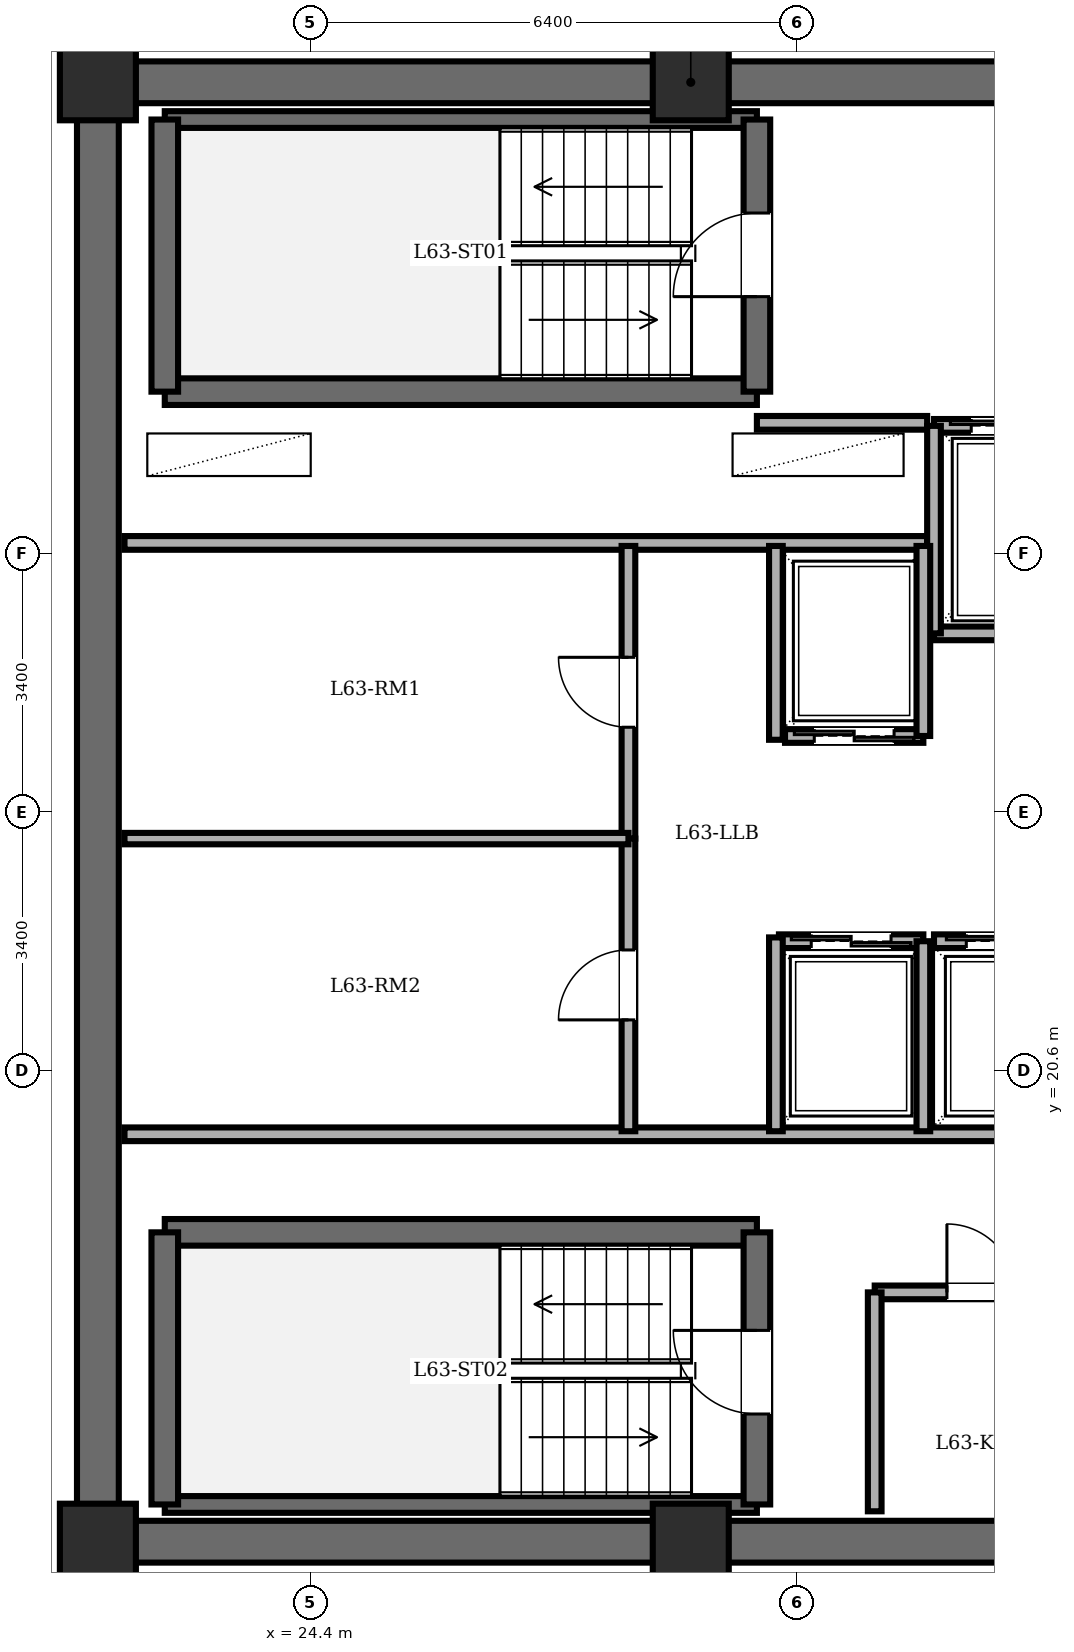
"""IFC4 building model, lengths in metres.
Left out: names, types, materials, properties, quantities, classifications, styles, units other than length and angle.
Written with IfcOpenShell. Run it as: python <this file> out.ifc"""

import sys

from ifc_helpers import new_model, si_unit, direction, frame, frame_2d, origin, origin_2d, place, context, subcontext, project, spatial, rectangle, extrude, element, fill, save


model = new_model("IFC4")
c1 = context("Model", 3, precision=1e-05, world=origin(), true_north=direction((0.0, 1.0)))
c2 = subcontext(c1, "Body", "Model", "MODEL_VIEW")
j1 = project(units=[si_unit("LENGTHUNIT", "METRE"), si_unit("PLANEANGLEUNIT", "RADIAN")], contexts=[c1])
p1 = place(None, origin())
s1 = spatial("IfcSite", under=j1, at=p1, CompositionType="ELEMENT")
p2 = place(p1, origin())
s2 = spatial("IfcBuilding", under=s1, at=p2, CompositionType="ELEMENT")
p3 = place(p2, frame((0.0, 0.0, 240.9)))
s3 = spatial("IfcBuildingStorey", under=s2, at=p3, CompositionType="ELEMENT", Elevation=240.9)
for number, where, z_axis, x_axis in (
    (1, (21.6, 14.4, 0.0), (0.0, 0.0, 1.0), (1.0, 0.0, 0.0)),
    (2, (29.4, 14.4, 0.0), (0.0, 0.0, 1.0), (1.0, 0.0, 0.0)),
    (3, (29.4, 33.6, 0.0), (0.0, 0.0, 1.0), (1.0, 0.0, 0.0)),
    (4, (21.6, 33.6, 0.0), (0.0, 0.0, 1.0), (1.0, 0.0, 0.0)),
):
    element("IfcColumn", number, at=place(p3, frame(where, z_axis=z_axis, x_axis=x_axis)), inside=s3, PredefinedType="COLUMN", context=c2, shape_type="SweptSolid", body=[
        extrude(rectangle(XDim=1.0, YDim=1.0, at=origin_2d()), origin(), (0.0, 0.0, 1.0), 3.6),
    ])
p4 = place(p3, frame((21.6, 14.4, 0.0), z_axis=(0.0, 0.0, 1.0), x_axis=(0.0, 1.0, 0.0)))
e5 = element("IfcWall", 5, at=p4, inside=s3, PredefinedType="SHEAR", context=c2, shape_type="SweptSolid", body=[
    extrude(rectangle(XDim=19.2, YDim=0.55, at=frame_2d((9.6, 0.0))), origin(), (0.0, 0.0, 1.0), 3.4),
])
for number, where, z_axis, x_axis in (
    (6, (21.6, 33.6, 0.0), (0.0, 0.0, 1.0), (1.0, 0.0, 0.0)),
    (7, (37.2, 14.4, 0.0), (0.0, 0.0, 1.0), (-1.0, 0.0, 0.0)),
):
    element("IfcWall", number, at=place(p3, frame(where, z_axis=z_axis, x_axis=x_axis)), inside=s3, PredefinedType="SHEAR", context=c2, shape_type="SweptSolid", body=[
        extrude(rectangle(XDim=15.6, YDim=0.55, at=frame_2d((7.8, 0.0))), origin(), (0.0, 0.0, 1.0), 3.4),
    ])
p5 = place(p3, frame((22.48, 29.53, 0.0), z_axis=(0.0, 0.0, 1.0), x_axis=(1.0, 0.0, 0.0)))
e8 = element("IfcWall", 8, at=p5, inside=s3, PredefinedType="SOLIDWALL", context=c2, shape_type="SweptSolid", body=[
    extrude(rectangle(XDim=7.79, YDim=0.35, at=frame_2d((3.895, 0.0))), origin(), (0.0, 0.0, 1.0), 3.4),
])
p6 = place(p3, frame((22.48, 33.11, 0.0), z_axis=(0.0, 0.0, 1.0), x_axis=(1.0, 0.0, 0.0)))
e9 = element("IfcWall", 9, at=p6, inside=s3, PredefinedType="PARTITIONING", context=c2, shape_type="SweptSolid", body=[
    extrude(rectangle(XDim=7.79, YDim=0.22, at=frame_2d((3.895, 0.0))), origin(), (0.0, 0.0, 1.0), 3.4),
])
p7 = place(p3, frame((22.48, 29.53, 0.0), z_axis=(0.0, 0.0, 1.0), x_axis=(0.0, 1.0, 0.0)))
e10 = element("IfcWall", 10, at=p7, inside=s3, PredefinedType="SOLIDWALL", context=c2, shape_type="SweptSolid", body=[
    extrude(rectangle(XDim=3.58, YDim=0.35, at=frame_2d((1.79, 0.0))), origin(), (0.0, 0.0, 1.0), 3.4),
])
p8 = place(p3, frame((30.27, 29.53, 0.0), z_axis=(0.0, 0.0, 1.0), x_axis=(0.0, 1.0, 0.0)))
e11 = element("IfcWall", 11, at=p8, inside=s3, PredefinedType="SOLIDWALL", context=c2, shape_type="SweptSolid", body=[
    extrude(rectangle(XDim=3.58, YDim=0.35, at=frame_2d((1.79, 0.0))), origin(), (0.0, 0.0, 1.0), 3.4),
])
p9 = place(p8, frame((1.25, 0.0, 0.0)))
e12 = element("IfcOpeningElement", 12, at=p9, cuts=e11, PredefinedType="OPENING", context=c2, shape_type="SweptSolid", body=[
    extrude(rectangle(XDim=1.1, YDim=2.15, at=frame_2d((0.55, 1.075))), frame((0.0, 0.185, 0.0), z_axis=(0.0, -1.0, 0.0), x_axis=(1.0, 0.0, 0.0)), (0.0, 0.0, 1.0), 0.37),
])
p10 = place(p3, frame((22.48, 18.47, 0.0), z_axis=(0.0, 0.0, 1.0), x_axis=(1.0, 0.0, 0.0)))
e13 = element("IfcWall", 13, at=p10, inside=s3, PredefinedType="SOLIDWALL", context=c2, shape_type="SweptSolid", body=[
    extrude(rectangle(XDim=7.79, YDim=0.35, at=frame_2d((3.895, 0.0))), origin(), (0.0, 0.0, 1.0), 3.4),
])
p11 = place(p3, frame((22.48, 14.89, 0.0), z_axis=(0.0, 0.0, 1.0), x_axis=(1.0, 0.0, 0.0)))
e14 = element("IfcWall", 14, at=p11, inside=s3, PredefinedType="PARTITIONING", context=c2, shape_type="SweptSolid", body=[
    extrude(rectangle(XDim=7.79, YDim=0.22, at=frame_2d((3.895, 0.0))), origin(), (0.0, 0.0, 1.0), 3.4),
])
p12 = place(p3, frame((22.48, 14.89, 0.0), z_axis=(0.0, 0.0, 1.0), x_axis=(0.0, 1.0, 0.0)))
e15 = element("IfcWall", 15, at=p12, inside=s3, PredefinedType="SOLIDWALL", context=c2, shape_type="SweptSolid", body=[
    extrude(rectangle(XDim=3.58, YDim=0.35, at=frame_2d((1.79, 0.0))), origin(), (0.0, 0.0, 1.0), 3.4),
])
p13 = place(p3, frame((30.27, 14.89, 0.0), z_axis=(0.0, 0.0, 1.0), x_axis=(0.0, 1.0, 0.0)))
e16 = element("IfcWall", 16, at=p13, inside=s3, PredefinedType="SOLIDWALL", context=c2, shape_type="SweptSolid", body=[
    extrude(rectangle(XDim=3.58, YDim=0.35, at=frame_2d((1.79, 0.0))), origin(), (0.0, 0.0, 1.0), 3.4),
])
p14 = place(p13, frame((1.19, 0.0, 0.0)))
e17 = element("IfcOpeningElement", 17, at=p14, cuts=e16, PredefinedType="OPENING", context=c2, shape_type="SweptSolid", body=[
    extrude(rectangle(XDim=1.1, YDim=2.15, at=frame_2d((0.55, 1.075))), frame((0.0, 0.185, 0.0), z_axis=(0.0, -1.0, 0.0), x_axis=(1.0, 0.0, 0.0)), (0.0, 0.0, 1.0), 0.37),
])
p15 = place(p3, frame((30.27, 29.12, 0.0), z_axis=(0.0, 0.0, 1.0), x_axis=(1.0, 0.0, 0.0)))
e18 = element("IfcWall", 18, at=p15, inside=s3, PredefinedType="PARTITIONING", context=c2, shape_type="SweptSolid", body=[
    extrude(rectangle(XDim=2.24, YDim=0.18, at=frame_2d((1.12, 0.0))), origin(), (0.0, 0.0, 1.0), 3.4),
])
p16 = place(p3, frame((21.95, 27.54, 0.0), z_axis=(0.0, 0.0, 1.0), x_axis=(1.0, 0.0, 0.0)))
e19 = element("IfcWall", 19, at=p16, inside=s3, PredefinedType="PARTITIONING", context=c2, shape_type="SweptSolid", body=[
    extrude(rectangle(XDim=10.56, YDim=0.18, at=frame_2d((5.28, 0.0))), origin(), (0.0, 0.0, 1.0), 3.4),
])
p17 = place(p3, frame((21.95, 19.76, 0.0), z_axis=(0.0, 0.0, 1.0), x_axis=(1.0, 0.0, 0.0)))
e20 = element("IfcWall", 20, at=p17, inside=s3, PredefinedType="PARTITIONING", context=c2, shape_type="SweptSolid", body=[
    extrude(rectangle(XDim=14.87, YDim=0.18, at=frame_2d((7.435, 0.0))), origin(), (0.0, 0.0, 1.0), 3.4),
])
p18 = place(p3, frame((31.82, 17.68, 0.0), z_axis=(0.0, 0.0, 1.0), x_axis=(1.0, 0.0, 0.0)))
e21 = element("IfcWall", 21, at=p18, inside=s3, PredefinedType="PARTITIONING", context=c2, shape_type="SweptSolid", body=[
    extrude(rectangle(XDim=2.66, YDim=0.18, at=frame_2d((1.33, 0.0))), origin(), (0.0, 0.0, 1.0), 3.4),
])
p19 = place(p18, frame((0.95, 0.0, 0.0)))
e22 = element("IfcOpeningElement", 22, at=p19, cuts=e21, PredefinedType="OPENING", context=c2, shape_type="SweptSolid", body=[
    extrude(rectangle(XDim=0.9, YDim=2.05, at=frame_2d((0.45, 1.025))), frame((0.0, 0.1, 0.0), z_axis=(0.0, -1.0, 0.0), x_axis=(1.0, 0.0, 0.0)), (0.0, 0.0, 1.0), 0.2),
])
p20 = place(p3, frame((31.82, 14.8, 0.0), z_axis=(0.0, 0.0, 1.0), x_axis=(0.0, 1.0, 0.0)))
e23 = element("IfcWall", 23, at=p20, inside=s3, PredefinedType="PARTITIONING", context=c2, shape_type="SweptSolid", body=[
    extrude(rectangle(XDim=2.88, YDim=0.18, at=frame_2d((1.44, 0.0))), origin(), (0.0, 0.0, 1.0), 3.4),
])
p21 = place(p3, frame((32.6, 29.08, 0.0), z_axis=(0.0, 0.0, 1.0), x_axis=(1.0, 0.0, 0.0)))
e24 = element("IfcWall", 24, at=p21, inside=s3, PredefinedType="PARTITIONING", context=c2, shape_type="SweptSolid", body=[
    extrude(rectangle(XDim=2.08, YDim=0.18, at=frame_2d((1.04, 0.0))), origin(), (0.0, 0.0, 1.0), 3.4),
])
p22 = place(p21, frame((0.49, 0.0, 0.0)))
e25 = element("IfcOpeningElement", 25, at=p22, cuts=e24, PredefinedType="OPENING", context=c2, shape_type="SweptSolid", body=[
    extrude(rectangle(XDim=1.1, YDim=2.2, at=frame_2d((0.55, 1.1))), frame((0.0, 0.1, 0.0), z_axis=(0.0, -1.0, 0.0), x_axis=(1.0, 0.0, 0.0)), (0.0, 0.0, 1.0), 0.2),
])
p23 = place(p3, frame((34.68, 26.35, 0.0), z_axis=(0.0, 0.0, 1.0), x_axis=(-1.0, 0.0, 0.0)))
e26 = element("IfcWall", 26, at=p23, inside=s3, PredefinedType="PARTITIONING", context=c2, shape_type="SweptSolid", body=[
    extrude(rectangle(XDim=2.08, YDim=0.18, at=frame_2d((1.04, 0.0))), origin(), (0.0, 0.0, 1.0), 3.4),
])
p24 = place(p3, frame((32.6, 29.08, 0.0), z_axis=(0.0, 0.0, 1.0), x_axis=(0.0, -1.0, 0.0)))
e27 = element("IfcWall", 27, at=p24, inside=s3, PredefinedType="PARTITIONING", context=c2, shape_type="SweptSolid", body=[
    extrude(rectangle(XDim=2.73, YDim=0.18, at=frame_2d((1.365, 0.0))), origin(), (0.0, 0.0, 1.0), 3.4),
])
p25 = place(p3, frame((32.46, 25.0, 0.0), z_axis=(0.0, 0.0, 1.0), x_axis=(-1.0, 0.0, 0.0)))
e28 = element("IfcWall", 28, at=p25, inside=s3, PredefinedType="PARTITIONING", context=c2, shape_type="SweptSolid", body=[
    extrude(rectangle(XDim=1.82, YDim=0.18, at=frame_2d((0.91, 0.0))), origin(), (0.0, 0.0, 1.0), 3.4),
])
p26 = place(p25, frame((0.385, 0.0, 0.0)))
e29 = element("IfcOpeningElement", 29, at=p26, cuts=e28, PredefinedType="OPENING", context=c2, shape_type="SweptSolid", body=[
    extrude(rectangle(XDim=1.05, YDim=2.2, at=frame_2d((0.525, 1.1))), frame((0.0, 0.1, 0.0), z_axis=(0.0, -1.0, 0.0), x_axis=(1.0, 0.0, 0.0)), (0.0, 0.0, 1.0), 0.2),
])
p27 = place(p3, frame((32.46, 25.0, 0.0), z_axis=(0.0, 0.0, 1.0), x_axis=(0.0, 1.0, 0.0)))
e30 = element("IfcWall", 30, at=p27, inside=s3, PredefinedType="PARTITIONING", context=c2, shape_type="SweptSolid", body=[
    extrude(rectangle(XDim=2.5, YDim=0.18, at=frame_2d((1.25, 0.0))), origin(), (0.0, 0.0, 1.0), 3.4),
])
p28 = place(p3, frame((30.56, 22.3, 0.0), z_axis=(0.0, 0.0, 1.0), x_axis=(1.0, 0.0, 0.0)))
e31 = element("IfcWall", 31, at=p28, inside=s3, PredefinedType="PARTITIONING", context=c2, shape_type="SweptSolid", body=[
    extrude(rectangle(XDim=1.9, YDim=0.18, at=frame_2d((0.95, 0.0))), origin(), (0.0, 0.0, 1.0), 3.4),
])
p29 = place(p28, frame((0.425, 0.0, 0.0)))
e32 = element("IfcOpeningElement", 32, at=p29, cuts=e31, PredefinedType="OPENING", context=c2, shape_type="SweptSolid", body=[
    extrude(rectangle(XDim=1.05, YDim=2.2, at=frame_2d((0.525, 1.1))), frame((0.0, 0.1, 0.0), z_axis=(0.0, -1.0, 0.0), x_axis=(1.0, 0.0, 0.0)), (0.0, 0.0, 1.0), 0.2),
])
p30 = place(p3, frame((32.46, 19.8, 0.0), z_axis=(0.0, 0.0, 1.0), x_axis=(0.0, 1.0, 0.0)))
e33 = element("IfcWall", 33, at=p30, inside=s3, PredefinedType="PARTITIONING", context=c2, shape_type="SweptSolid", body=[
    extrude(rectangle(XDim=2.5, YDim=0.18, at=frame_2d((1.25, 0.0))), origin(), (0.0, 0.0, 1.0), 3.4),
])
p31 = place(p3, frame((32.6, 22.3, 0.0), z_axis=(0.0, 0.0, 1.0), x_axis=(1.0, 0.0, 0.0)))
e34 = element("IfcWall", 34, at=p31, inside=s3, PredefinedType="PARTITIONING", context=c2, shape_type="SweptSolid", body=[
    extrude(rectangle(XDim=1.9, YDim=0.18, at=frame_2d((0.95, 0.0))), origin(), (0.0, 0.0, 1.0), 3.4),
])
p32 = place(p31, frame((0.425, 0.0, 0.0)))
e35 = element("IfcOpeningElement", 35, at=p32, cuts=e34, PredefinedType="OPENING", context=c2, shape_type="SweptSolid", body=[
    extrude(rectangle(XDim=1.05, YDim=2.2, at=frame_2d((0.525, 1.1))), frame((0.0, 0.1, 0.0), z_axis=(0.0, -1.0, 0.0), x_axis=(1.0, 0.0, 0.0)), (0.0, 0.0, 1.0), 0.2),
])
for number, where, z_axis, x_axis in (
    (36, (30.52, 24.95, 0.0), (0.0, 0.0, 1.0), (0.0, 1.0, 0.0)),
    (37, (30.52, 19.8, 0.0), (0.0, 0.0, 1.0), (0.0, 1.0, 0.0)),
):
    element("IfcWall", number, at=place(p3, frame(where, z_axis=z_axis, x_axis=x_axis)), inside=s3, PredefinedType="PARTITIONING", context=c2, shape_type="SweptSolid", body=[
        extrude(rectangle(XDim=2.55, YDim=0.18, at=frame_2d((1.275, 0.0))), origin(), (0.0, 0.0, 1.0), 3.4),
    ])
p33 = place(p3, frame((28.58, 23.65, 0.0), z_axis=(0.0, 0.0, 1.0), x_axis=(0.0, 1.0, 0.0)))
e38 = element("IfcWall", 38, at=p33, inside=s3, PredefinedType="PARTITIONING", context=c2, shape_type="SweptSolid", body=[
    extrude(rectangle(XDim=3.85, YDim=0.18, at=frame_2d((1.925, 0.0))), origin(), (0.0, 0.0, 1.0), 3.4),
])
p34 = place(p33, frame((1.465, 0.0, 0.0)))
e39 = element("IfcOpeningElement", 39, at=p34, cuts=e38, PredefinedType="OPENING", context=c2, shape_type="SweptSolid", body=[
    extrude(rectangle(XDim=0.92, YDim=2.1, at=frame_2d((0.46, 1.05))), frame((0.0, 0.1, 0.0), z_axis=(0.0, -1.0, 0.0), x_axis=(1.0, 0.0, 0.0)), (0.0, 0.0, 1.0), 0.2),
])
p35 = place(p3, frame((28.58, 19.8, 0.0), z_axis=(0.0, 0.0, 1.0), x_axis=(0.0, 1.0, 0.0)))
e40 = element("IfcWall", 40, at=p35, inside=s3, PredefinedType="PARTITIONING", context=c2, shape_type="SweptSolid", body=[
    extrude(rectangle(XDim=3.85, YDim=0.18, at=frame_2d((1.925, 0.0))), origin(), (0.0, 0.0, 1.0), 3.4),
])
p36 = place(p35, frame((1.465, 0.0, 0.0)))
e41 = element("IfcOpeningElement", 41, at=p36, cuts=e40, PredefinedType="OPENING", context=c2, shape_type="SweptSolid", body=[
    extrude(rectangle(XDim=0.92, YDim=2.1, at=frame_2d((0.46, 1.05))), frame((0.0, 0.1, 0.0), z_axis=(0.0, -1.0, 0.0), x_axis=(1.0, 0.0, 0.0)), (0.0, 0.0, 1.0), 0.2),
])
p37 = place(p3, frame((21.95, 23.65, 0.0), z_axis=(0.0, 0.0, 1.0), x_axis=(1.0, 0.0, 0.0)))
e42 = element("IfcWall", 42, at=p37, inside=s3, PredefinedType="PARTITIONING", context=c2, shape_type="SweptSolid", body=[
    extrude(rectangle(XDim=6.63, YDim=0.15, at=frame_2d((3.315, 0.0))), origin(), (0.0, 0.0, 1.0), 3.4),
])
p38 = place(p9, origin())
e43 = element("IfcDoor", 43, at=p38, inside=s3, OperationType="SINGLE_SWING_LEFT", PredefinedType="DOOR", context=c2, shape_type="SweptSolid", body=[
    extrude(rectangle(XDim=1.1, YDim=2.15, at=frame_2d((0.55, 1.075))), frame((0.0, 0.025, 0.0), z_axis=(0.0, -1.0, 0.0), x_axis=(1.0, 0.0, 0.0)), (0.0, 0.0, 1.0), 0.05),
])
fill(e12, e43)
p39 = place(p14, origin())
e44 = element("IfcDoor", 44, at=p39, inside=s3, OperationType="SINGLE_SWING_RIGHT", PredefinedType="DOOR", context=c2, shape_type="SweptSolid", body=[
    extrude(rectangle(XDim=1.1, YDim=2.15, at=frame_2d((0.55, 1.075))), frame((0.0, 0.025, 0.0), z_axis=(0.0, -1.0, 0.0), x_axis=(1.0, 0.0, 0.0)), (0.0, 0.0, 1.0), 0.05),
])
fill(e17, e44)
p40 = place(p19, origin())
e45 = element("IfcDoor", 45, at=p40, inside=s3, OperationType="SINGLE_SWING_LEFT", PredefinedType="DOOR", context=c2, shape_type="SweptSolid", body=[
    extrude(rectangle(XDim=0.9, YDim=2.05, at=frame_2d((0.45, 1.025))), frame((0.0, 0.025, 0.0), z_axis=(0.0, -1.0, 0.0), x_axis=(1.0, 0.0, 0.0)), (0.0, 0.0, 1.0), 0.05),
])
fill(e22, e45)
p41 = place(p22, origin())
e46 = element("IfcDoor", 46, at=p41, inside=s3, OperationType="DOUBLE_DOOR_SLIDING", PredefinedType="DOOR", context=c2, shape_type="SweptSolid", body=[
    extrude(rectangle(XDim=1.1, YDim=2.2, at=frame_2d((0.55, 1.1))), frame((0.0, 0.025, 0.0), z_axis=(0.0, -1.0, 0.0), x_axis=(1.0, 0.0, 0.0)), (0.0, 0.0, 1.0), 0.05),
])
fill(e25, e46)
p42 = place(p26, origin())
e47 = element("IfcDoor", 47, at=p42, inside=s3, OperationType="DOUBLE_DOOR_SLIDING", PredefinedType="DOOR", context=c2, shape_type="SweptSolid", body=[
    extrude(rectangle(XDim=1.05, YDim=2.2, at=frame_2d((0.525, 1.1))), frame((0.0, 0.025, 0.0), z_axis=(0.0, -1.0, 0.0), x_axis=(1.0, 0.0, 0.0)), (0.0, 0.0, 1.0), 0.05),
])
fill(e29, e47)
p43 = place(p29, origin())
e48 = element("IfcDoor", 48, at=p43, inside=s3, OperationType="DOUBLE_DOOR_SLIDING", PredefinedType="DOOR", context=c2, shape_type="SweptSolid", body=[
    extrude(rectangle(XDim=1.05, YDim=2.2, at=frame_2d((0.525, 1.1))), frame((0.0, 0.025, 0.0), z_axis=(0.0, -1.0, 0.0), x_axis=(1.0, 0.0, 0.0)), (0.0, 0.0, 1.0), 0.05),
])
fill(e32, e48)
p44 = place(p32, origin())
e49 = element("IfcDoor", 49, at=p44, inside=s3, OperationType="DOUBLE_DOOR_SLIDING", PredefinedType="DOOR", context=c2, shape_type="SweptSolid", body=[
    extrude(rectangle(XDim=1.05, YDim=2.2, at=frame_2d((0.525, 1.1))), frame((0.0, 0.025, 0.0), z_axis=(0.0, -1.0, 0.0), x_axis=(1.0, 0.0, 0.0)), (0.0, 0.0, 1.0), 0.05),
])
fill(e35, e49)
p45 = place(p34, origin())
e50 = element("IfcDoor", 50, at=p45, inside=s3, OperationType="SINGLE_SWING_RIGHT", PredefinedType="DOOR", context=c2, shape_type="SweptSolid", body=[
    extrude(rectangle(XDim=0.92, YDim=2.1, at=frame_2d((0.46, 1.05))), frame((0.0, 0.025, 0.0), z_axis=(0.0, -1.0, 0.0), x_axis=(1.0, 0.0, 0.0)), (0.0, 0.0, 1.0), 0.05),
])
fill(e39, e50)
p46 = place(p36, origin())
e51 = element("IfcDoor", 51, at=p46, inside=s3, OperationType="SINGLE_SWING_LEFT", PredefinedType="DOOR", context=c2, shape_type="SweptSolid", body=[
    extrude(rectangle(XDim=0.92, YDim=2.1, at=frame_2d((0.46, 1.05))), frame((0.0, 0.025, 0.0), z_axis=(0.0, -1.0, 0.0), x_axis=(1.0, 0.0, 0.0)), (0.0, 0.0, 1.0), 0.05),
])
fill(e41, e51)
save(model, sys.argv[1])
